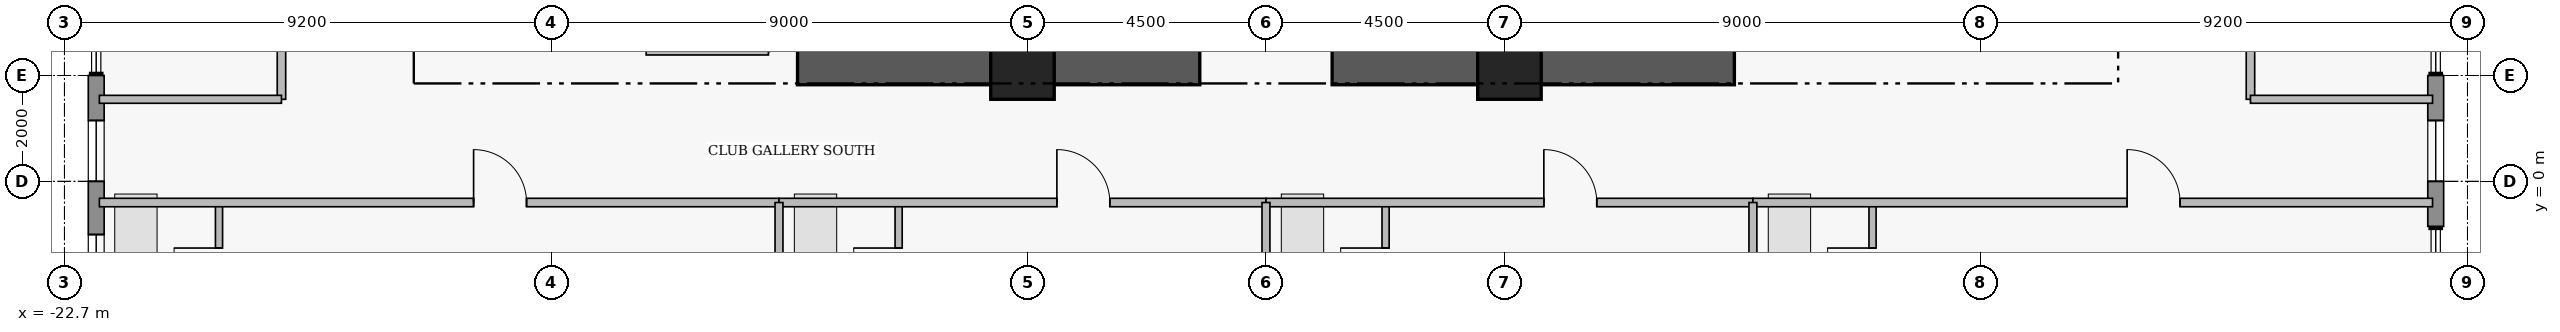
"""IFC4 building model, lengths in metres.
Left out: names, types, materials, properties, quantities, classifications, styles, units other than length and angle.
Written with IfcOpenShell. Run it as: python <this file> out.ifc"""

import sys

from ifc_helpers import new_model, si_unit, direction, frame, frame_2d, origin, origin_2d, place, context, subcontext, project, spatial, rectangle, extrude, element, fill, save


model = new_model("IFC4")
c1 = context("Model", 3, precision=1e-05, world=origin(), true_north=direction((0.0, 1.0)))
c2 = subcontext(c1, "Body", "Model", "MODEL_VIEW")
j1 = project(units=[si_unit("LENGTHUNIT", "METRE"), si_unit("PLANEANGLEUNIT", "RADIAN")], contexts=[c1])
p1 = place(None, origin())
s1 = spatial("IfcSite", under=j1, at=p1, CompositionType="ELEMENT")
p2 = place(p1, origin())
s2 = spatial("IfcBuilding", under=s1, at=p2, CompositionType="ELEMENT")
p3 = place(p2, frame((0.0, 0.0, 222.4)))
s3 = spatial("IfcBuildingStorey", under=s2, at=p3, CompositionType="ELEMENT", Elevation=222.4)
for number, where, z_axis, x_axis in (
    (1, (-8.85, 2.15, 0.0), (0.0, 0.0, 1.0), (1.0, 0.0, 0.0)),
    (2, (1.25, 2.15, 0.0), (0.0, 0.0, 1.0), (1.0, 0.0, 0.0)),
):
    element("IfcWall", number, at=place(p3, frame(where, z_axis=z_axis, x_axis=x_axis)), inside=s3, PredefinedType="SHEAR", context=c2, shape_type="SweptSolid", body=[
        extrude(rectangle(XDim=7.6, YDim=0.65, at=frame_2d((3.8, 0.0))), origin(), (0.0, 0.0, 1.0), 3.53),
    ])
for number, where, z_axis, x_axis in (
    (3, (-4.6, 2.15, 0.0), (0.0, 0.0, 1.0), (1.0, 0.0, 0.0)),
    (4, (4.6, 2.15, 0.0), (0.0, 0.0, 1.0), (1.0, 0.0, 0.0)),
):
    element("IfcColumn", number, at=place(p3, frame(where, z_axis=z_axis, x_axis=x_axis)), inside=s3, PredefinedType="COLUMN", context=c2, shape_type="SweptSolid", body=[
        extrude(rectangle(XDim=1.2, YDim=1.2, at=origin_2d()), origin(), (0.0, 0.0, 1.0), 3.75),
    ])
p4 = place(p3, frame((-22.1, -4.2, 0.0), z_axis=(0.0, 0.0, 1.0), x_axis=(0.0, 1.0, 0.0)))
e5 = element("IfcWall", 5, at=p4, inside=s3, PredefinedType="STANDARD", context=c2, shape_type="SweptSolid", body=[
    extrude(rectangle(XDim=6.2, YDim=0.3, at=frame_2d((3.1, 0.0))), origin(), (0.0, 0.0, 1.0), 3.53),
])
p5 = place(p4, frame((2.045, 0.0, 0.95)))
e6 = element("IfcOpeningElement", 6, at=p5, cuts=e5, PredefinedType="OPENING", context=c2, shape_type="SweptSolid", body=[
    extrude(rectangle(XDim=1.15, YDim=1.55, at=frame_2d((0.575, 0.775))), frame((0.0, 0.16, 0.0), z_axis=(0.0, -1.0, 0.0), x_axis=(1.0, 0.0, 0.0)), (0.0, 0.0, 1.0), 0.32),
])
p6 = place(p4, frame((4.2, 0.0, 0.95)))
e7 = element("IfcOpeningElement", 7, at=p6, cuts=e5, PredefinedType="OPENING", context=c2, shape_type="SweptSolid", body=[
    extrude(rectangle(XDim=1.15, YDim=1.55, at=frame_2d((0.575, 0.775))), frame((0.0, 0.16, 0.0), z_axis=(0.0, -1.0, 0.0), x_axis=(1.0, 0.0, 0.0)), (0.0, 0.0, 1.0), 0.32),
])
p7 = place(p3, frame((22.1, 2.0, 0.0), z_axis=(0.0, 0.0, 1.0), x_axis=(0.0, -1.0, 0.0)))
e8 = element("IfcWall", 8, at=p7, inside=s3, PredefinedType="STANDARD", context=c2, shape_type="SweptSolid", body=[
    extrude(rectangle(XDim=2.85, YDim=0.3, at=frame_2d((1.425, 0.0))), origin(), (0.0, 0.0, 1.0), 3.53),
])
p8 = place(p7, frame((0.85, 0.0, 0.95)))
e9 = element("IfcOpeningElement", 9, at=p8, cuts=e8, PredefinedType="OPENING", context=c2, shape_type="SweptSolid", body=[
    extrude(rectangle(XDim=1.15, YDim=1.55, at=frame_2d((0.575, 0.775))), frame((0.0, 0.16, 0.0), z_axis=(0.0, -1.0, 0.0), x_axis=(1.0, 0.0, 0.0)), (0.0, 0.0, 1.0), 0.32),
])
p9 = place(p3, frame((-19.78, -2.76, 0.0), z_axis=(0.0, 0.0, 1.0), x_axis=(0.0, 1.0, 0.0)))
e10 = element("IfcWall", 10, at=p9, inside=s3, PredefinedType="PLUMBINGWALL", context=c2, shape_type="SweptSolid", body=[
    extrude(rectangle(XDim=2.36, YDim=0.135, at=frame_2d((1.18, 0.0))), origin(), (0.0, 0.0, 1.0), 3.53),
])
p10 = place(p9, frame((0.65, 0.0, 0.0)))
e11 = element("IfcOpeningElement", 11, at=p10, cuts=e10, PredefinedType="OPENING", context=c2, shape_type="SweptSolid", body=[
    extrude(rectangle(XDim=0.85, YDim=2.1, at=frame_2d((0.425, 1.05))), frame((0.0, 0.077, 0.0), z_axis=(0.0, -1.0, 0.0), x_axis=(1.0, 0.0, 0.0)), (0.0, 0.0, 1.0), 0.155),
])
p11 = place(p3, frame((-22.04, -0.4, 0.0), z_axis=(0.0, 0.0, 1.0), x_axis=(1.0, 0.0, 0.0)))
e12 = element("IfcWall", 12, at=p11, inside=s3, PredefinedType="PARTITIONING", context=c2, shape_type="SweptSolid", body=[
    extrude(rectangle(XDim=12.84, YDim=0.16, at=frame_2d((6.42, 0.0))), origin(), (0.0, 0.0, 1.0), 3.53),
])
p12 = place(p11, frame((7.07, 0.0, 0.0)))
e13 = element("IfcOpeningElement", 13, at=p12, cuts=e12, PredefinedType="OPENING", context=c2, shape_type="SweptSolid", body=[
    extrude(rectangle(XDim=1.0, YDim=2.15, at=frame_2d((0.5, 1.075))), frame((0.0, 0.09, 0.0), z_axis=(0.0, -1.0, 0.0), x_axis=(1.0, 0.0, 0.0)), (0.0, 0.0, 1.0), 0.18),
])
p13 = place(p3, frame((-6.94, -2.76, 0.0), z_axis=(0.0, 0.0, 1.0), x_axis=(0.0, 1.0, 0.0)))
e14 = element("IfcWall", 14, at=p13, inside=s3, PredefinedType="PLUMBINGWALL", context=c2, shape_type="SweptSolid", body=[
    extrude(rectangle(XDim=2.36, YDim=0.135, at=frame_2d((1.18, 0.0))), origin(), (0.0, 0.0, 1.0), 3.53),
])
p14 = place(p13, frame((0.65, 0.0, 0.0)))
e15 = element("IfcOpeningElement", 15, at=p14, cuts=e14, PredefinedType="OPENING", context=c2, shape_type="SweptSolid", body=[
    extrude(rectangle(XDim=0.85, YDim=2.1, at=frame_2d((0.425, 1.05))), frame((0.0, 0.077, 0.0), z_axis=(0.0, -1.0, 0.0), x_axis=(1.0, 0.0, 0.0)), (0.0, 0.0, 1.0), 0.155),
])
p15 = place(p3, frame((-9.2, -0.4, 0.0), z_axis=(0.0, 0.0, 1.0), x_axis=(1.0, 0.0, 0.0)))
e16 = element("IfcWall", 16, at=p15, inside=s3, PredefinedType="PARTITIONING", context=c2, shape_type="SweptSolid", body=[
    extrude(rectangle(XDim=9.2, YDim=0.16, at=frame_2d((4.6, 0.0))), origin(), (0.0, 0.0, 1.0), 3.53),
])
p16 = place(p15, frame((5.25, 0.0, 0.0)))
e17 = element("IfcOpeningElement", 17, at=p16, cuts=e16, PredefinedType="OPENING", context=c2, shape_type="SweptSolid", body=[
    extrude(rectangle(XDim=1.0, YDim=2.15, at=frame_2d((0.5, 1.075))), frame((0.0, 0.09, 0.0), z_axis=(0.0, -1.0, 0.0), x_axis=(1.0, 0.0, 0.0)), (0.0, 0.0, 1.0), 0.18),
])
p17 = place(p3, frame((2.26, -2.76, 0.0), z_axis=(0.0, 0.0, 1.0), x_axis=(0.0, 1.0, 0.0)))
e18 = element("IfcWall", 18, at=p17, inside=s3, PredefinedType="PLUMBINGWALL", context=c2, shape_type="SweptSolid", body=[
    extrude(rectangle(XDim=2.36, YDim=0.135, at=frame_2d((1.18, 0.0))), origin(), (0.0, 0.0, 1.0), 3.53),
])
p18 = place(p17, frame((0.65, 0.0, 0.0)))
e19 = element("IfcOpeningElement", 19, at=p18, cuts=e18, PredefinedType="OPENING", context=c2, shape_type="SweptSolid", body=[
    extrude(rectangle(XDim=0.85, YDim=2.1, at=frame_2d((0.425, 1.05))), frame((0.0, 0.077, 0.0), z_axis=(0.0, -1.0, 0.0), x_axis=(1.0, 0.0, 0.0)), (0.0, 0.0, 1.0), 0.155),
])
p19 = place(p3, frame((0.0, -0.4, 0.0), z_axis=(0.0, 0.0, 1.0), x_axis=(1.0, 0.0, 0.0)))
e20 = element("IfcWall", 20, at=p19, inside=s3, PredefinedType="PARTITIONING", context=c2, shape_type="SweptSolid", body=[
    extrude(rectangle(XDim=9.2, YDim=0.16, at=frame_2d((4.6, 0.0))), origin(), (0.0, 0.0, 1.0), 3.53),
])
p20 = place(p19, frame((5.25, 0.0, 0.0)))
e21 = element("IfcOpeningElement", 21, at=p20, cuts=e20, PredefinedType="OPENING", context=c2, shape_type="SweptSolid", body=[
    extrude(rectangle(XDim=1.0, YDim=2.15, at=frame_2d((0.5, 1.075))), frame((0.0, 0.09, 0.0), z_axis=(0.0, -1.0, 0.0), x_axis=(1.0, 0.0, 0.0)), (0.0, 0.0, 1.0), 0.18),
])
p21 = place(p3, frame((11.46, -2.76, 0.0), z_axis=(0.0, 0.0, 1.0), x_axis=(0.0, 1.0, 0.0)))
e22 = element("IfcWall", 22, at=p21, inside=s3, PredefinedType="PLUMBINGWALL", context=c2, shape_type="SweptSolid", body=[
    extrude(rectangle(XDim=2.36, YDim=0.135, at=frame_2d((1.18, 0.0))), origin(), (0.0, 0.0, 1.0), 3.53),
])
p22 = place(p21, frame((0.65, 0.0, 0.0)))
e23 = element("IfcOpeningElement", 23, at=p22, cuts=e22, PredefinedType="OPENING", context=c2, shape_type="SweptSolid", body=[
    extrude(rectangle(XDim=0.85, YDim=2.1, at=frame_2d((0.425, 1.05))), frame((0.0, 0.077, 0.0), z_axis=(0.0, -1.0, 0.0), x_axis=(1.0, 0.0, 0.0)), (0.0, 0.0, 1.0), 0.155),
])
p23 = place(p3, frame((9.2, -0.4, 0.0), z_axis=(0.0, 0.0, 1.0), x_axis=(1.0, 0.0, 0.0)))
e24 = element("IfcWall", 24, at=p23, inside=s3, PredefinedType="PARTITIONING", context=c2, shape_type="SweptSolid", body=[
    extrude(rectangle(XDim=12.84, YDim=0.16, at=frame_2d((6.42, 0.0))), origin(), (0.0, 0.0, 1.0), 3.53),
])
p24 = place(p23, frame((7.07, 0.0, 0.0)))
e25 = element("IfcOpeningElement", 25, at=p24, cuts=e24, PredefinedType="OPENING", context=c2, shape_type="SweptSolid", body=[
    extrude(rectangle(XDim=1.0, YDim=2.15, at=frame_2d((0.5, 1.075))), frame((0.0, 0.09, 0.0), z_axis=(0.0, -1.0, 0.0), x_axis=(1.0, 0.0, 0.0)), (0.0, 0.0, 1.0), 0.18),
])
p25 = place(p3, frame((18.6, 1.55, 0.0), z_axis=(0.0, 0.0, 1.0), x_axis=(0.0, 1.0, 0.0)))
e26 = element("IfcWall", 26, at=p25, inside=s3, PredefinedType="PARTITIONING", context=c2, shape_type="SweptSolid", body=[
    extrude(rectangle(XDim=6.25, YDim=0.16, at=frame_2d((3.125, 0.0))), origin(), (0.0, 0.0, 1.0), 3.53),
])
p26 = place(p25, frame((2.665, 0.0, 0.0)))
e27 = element("IfcOpeningElement", 27, at=p26, cuts=e26, PredefinedType="OPENING", context=c2, shape_type="SweptSolid", body=[
    extrude(rectangle(XDim=0.92, YDim=2.12, at=frame_2d((0.46, 1.06))), frame((0.0, 0.09, 0.0), z_axis=(0.0, -1.0, 0.0), x_axis=(1.0, 0.0, 0.0)), (0.0, 0.0, 1.0), 0.18),
])
p27 = place(p3, frame((-18.6, 1.55, 0.0), z_axis=(0.0, 0.0, 1.0), x_axis=(0.0, 1.0, 0.0)))
e28 = element("IfcWall", 28, at=p27, inside=s3, PredefinedType="PARTITIONING", context=c2, shape_type="SweptSolid", body=[
    extrude(rectangle(XDim=5.2, YDim=0.16, at=frame_2d((2.6, 0.0))), origin(), (0.0, 0.0, 1.0), 3.53),
])
p28 = place(p27, frame((2.125, 0.0, 0.0)))
e29 = element("IfcOpeningElement", 29, at=p28, cuts=e28, PredefinedType="OPENING", context=c2, shape_type="SweptSolid", body=[
    extrude(rectangle(XDim=0.95, YDim=2.15, at=frame_2d((0.475, 1.075))), frame((0.0, 0.09, 0.0), z_axis=(0.0, -1.0, 0.0), x_axis=(1.0, 0.0, 0.0)), (0.0, 0.0, 1.0), 0.18),
])
p29 = place(p3, frame((-11.71, 2.47, 0.0), z_axis=(0.0, 0.0, 1.0), x_axis=(1.0, 0.0, 0.0)))
e30 = element("IfcWall", 30, at=p29, inside=s3, PredefinedType="PARTITIONING", context=c2, shape_type="SweptSolid", body=[
    extrude(rectangle(XDim=2.31, YDim=0.165, at=frame_2d((1.155, 0.0))), origin(), (0.0, 0.0, 1.0), 2.43),
])
for number, where, z_axis, x_axis in (
    (31, (-9.2, -7.52, 0.0), (0.0, 0.0, 1.0), (0.0, 1.0, 0.0)),
    (32, (0.0, -7.52, 0.0), (0.0, 0.0, 1.0), (0.0, 1.0, 0.0)),
    (33, (9.2, -7.52, 0.0), (0.0, 0.0, 1.0), (0.0, 1.0, 0.0)),
):
    element("IfcWall", number, at=place(p3, frame(where, z_axis=z_axis, x_axis=x_axis)), inside=s3, PredefinedType="PARTITIONING", context=c2, shape_type="SweptSolid", body=[
        extrude(rectangle(XDim=7.12, YDim=0.15, at=frame_2d((3.56, 0.0))), origin(), (0.0, 0.0, 1.0), 3.53),
    ])
for number, where, z_axis, x_axis in (
    (34, (18.6, 1.55, 0.0), (0.0, 0.0, 1.0), (1.0, 0.0, 0.0)),
    (35, (-22.04, 1.55, 0.0), (0.0, 0.0, 1.0), (1.0, 0.0, 0.0)),
):
    element("IfcWall", number, at=place(p3, frame(where, z_axis=z_axis, x_axis=x_axis)), inside=s3, PredefinedType="PARTITIONING", context=c2, shape_type="SweptSolid", body=[
        extrude(rectangle(XDim=3.44, YDim=0.15, at=frame_2d((1.72, 0.0))), origin(), (0.0, 0.0, 1.0), 3.53),
    ])
p30 = place(p5, origin())
e36 = element("IfcWindow", 36, at=p30, inside=s3, PartitioningType="SINGLE_PANEL", PredefinedType="WINDOW", context=c2, shape_type="SweptSolid", body=[
    extrude(rectangle(XDim=1.15, YDim=1.55, at=frame_2d((0.575, 0.775))), frame((0.0, 0.03, 0.0), z_axis=(0.0, -1.0, 0.0), x_axis=(1.0, 0.0, 0.0)), (0.0, 0.0, 1.0), 0.06),
])
fill(e6, e36)
p31 = place(p6, origin())
e37 = element("IfcWindow", 37, at=p31, inside=s3, PartitioningType="SINGLE_PANEL", PredefinedType="WINDOW", context=c2, shape_type="SweptSolid", body=[
    extrude(rectangle(XDim=1.15, YDim=1.55, at=frame_2d((0.575, 0.775))), frame((0.0, 0.03, 0.0), z_axis=(0.0, -1.0, 0.0), x_axis=(1.0, 0.0, 0.0)), (0.0, 0.0, 1.0), 0.06),
])
fill(e7, e37)
p32 = place(p8, origin())
e38 = element("IfcWindow", 38, at=p32, inside=s3, PartitioningType="SINGLE_PANEL", PredefinedType="WINDOW", context=c2, shape_type="SweptSolid", body=[
    extrude(rectangle(XDim=1.15, YDim=1.55, at=frame_2d((0.575, 0.775))), frame((0.0, 0.03, 0.0), z_axis=(0.0, -1.0, 0.0), x_axis=(1.0, 0.0, 0.0)), (0.0, 0.0, 1.0), 0.06),
])
fill(e9, e38)
p33 = place(p10, origin())
e39 = element("IfcDoor", 39, at=p33, inside=s3, OperationType="SINGLE_SWING_RIGHT", PredefinedType="DOOR", context=c2, shape_type="SweptSolid", body=[
    extrude(rectangle(XDim=0.85, YDim=2.1, at=frame_2d((0.425, 1.05))), frame((0.0, 0.025, 0.0), z_axis=(0.0, -1.0, 0.0), x_axis=(1.0, 0.0, 0.0)), (0.0, 0.0, 1.0), 0.05),
])
fill(e11, e39)
p34 = place(p12, origin())
e40 = element("IfcDoor", 40, at=p34, inside=s3, OperationType="SINGLE_SWING_LEFT", PredefinedType="DOOR", context=c2, shape_type="SweptSolid", body=[
    extrude(rectangle(XDim=1.0, YDim=2.15, at=frame_2d((0.5, 1.075))), frame((0.0, 0.025, 0.0), z_axis=(0.0, -1.0, 0.0), x_axis=(1.0, 0.0, 0.0)), (0.0, 0.0, 1.0), 0.05),
])
fill(e13, e40)
p35 = place(p14, origin())
e41 = element("IfcDoor", 41, at=p35, inside=s3, OperationType="SINGLE_SWING_RIGHT", PredefinedType="DOOR", context=c2, shape_type="SweptSolid", body=[
    extrude(rectangle(XDim=0.85, YDim=2.1, at=frame_2d((0.425, 1.05))), frame((0.0, 0.025, 0.0), z_axis=(0.0, -1.0, 0.0), x_axis=(1.0, 0.0, 0.0)), (0.0, 0.0, 1.0), 0.05),
])
fill(e15, e41)
p36 = place(p16, origin())
e42 = element("IfcDoor", 42, at=p36, inside=s3, OperationType="SINGLE_SWING_LEFT", PredefinedType="DOOR", context=c2, shape_type="SweptSolid", body=[
    extrude(rectangle(XDim=1.0, YDim=2.15, at=frame_2d((0.5, 1.075))), frame((0.0, 0.025, 0.0), z_axis=(0.0, -1.0, 0.0), x_axis=(1.0, 0.0, 0.0)), (0.0, 0.0, 1.0), 0.05),
])
fill(e17, e42)
p37 = place(p18, origin())
e43 = element("IfcDoor", 43, at=p37, inside=s3, OperationType="SINGLE_SWING_RIGHT", PredefinedType="DOOR", context=c2, shape_type="SweptSolid", body=[
    extrude(rectangle(XDim=0.85, YDim=2.1, at=frame_2d((0.425, 1.05))), frame((0.0, 0.025, 0.0), z_axis=(0.0, -1.0, 0.0), x_axis=(1.0, 0.0, 0.0)), (0.0, 0.0, 1.0), 0.05),
])
fill(e19, e43)
p38 = place(p20, origin())
e44 = element("IfcDoor", 44, at=p38, inside=s3, OperationType="SINGLE_SWING_LEFT", PredefinedType="DOOR", context=c2, shape_type="SweptSolid", body=[
    extrude(rectangle(XDim=1.0, YDim=2.15, at=frame_2d((0.5, 1.075))), frame((0.0, 0.025, 0.0), z_axis=(0.0, -1.0, 0.0), x_axis=(1.0, 0.0, 0.0)), (0.0, 0.0, 1.0), 0.05),
])
fill(e21, e44)
p39 = place(p22, origin())
e45 = element("IfcDoor", 45, at=p39, inside=s3, OperationType="SINGLE_SWING_RIGHT", PredefinedType="DOOR", context=c2, shape_type="SweptSolid", body=[
    extrude(rectangle(XDim=0.85, YDim=2.1, at=frame_2d((0.425, 1.05))), frame((0.0, 0.025, 0.0), z_axis=(0.0, -1.0, 0.0), x_axis=(1.0, 0.0, 0.0)), (0.0, 0.0, 1.0), 0.05),
])
fill(e23, e45)
p40 = place(p24, origin())
e46 = element("IfcDoor", 46, at=p40, inside=s3, OperationType="SINGLE_SWING_LEFT", PredefinedType="DOOR", context=c2, shape_type="SweptSolid", body=[
    extrude(rectangle(XDim=1.0, YDim=2.15, at=frame_2d((0.5, 1.075))), frame((0.0, 0.025, 0.0), z_axis=(0.0, -1.0, 0.0), x_axis=(1.0, 0.0, 0.0)), (0.0, 0.0, 1.0), 0.05),
])
fill(e25, e46)
save(model, sys.argv[1])
